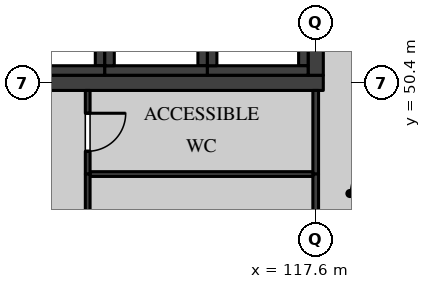
"""IFC4 building model, lengths in metres.
Left out: names, types, materials, properties, quantities, classifications, styles, units other than length and angle.
Written with IfcOpenShell. Run it as: python <this file> out.ifc"""

import sys

from ifc_helpers import new_model, si_unit, direction, frame, frame_2d, origin, place, context, subcontext, project, spatial, rectangle, extrude, element, fill, save


model = new_model("IFC4")
c1 = context("Model", 3, precision=1e-05, world=origin(), true_north=direction((0.0, 1.0)))
c2 = subcontext(c1, "Body", "Model", "MODEL_VIEW")
j1 = project(units=[si_unit("LENGTHUNIT", "METRE"), si_unit("PLANEANGLEUNIT", "RADIAN")], contexts=[c1])
p1 = place(None, origin())
s1 = spatial("IfcSite", under=j1, at=p1, CompositionType="ELEMENT")
p2 = place(p1, origin())
s2 = spatial("IfcBuilding", under=s1, at=p2, CompositionType="ELEMENT")
p3 = place(p2, origin())
s3 = spatial("IfcBuildingStorey", under=s2, at=p3, CompositionType="ELEMENT", Elevation=0.0)
p4 = place(p3, frame((109.0, 50.4, 0.0), z_axis=(0.0, 0.0, 1.0), x_axis=(1.0, 0.0, 0.0)))
e1 = element("IfcWall", 1, at=p4, inside=s3, PredefinedType="SHEAR", context=c2, shape_type="SweptSolid", body=[
    extrude(rectangle(XDim=8.8, YDim=0.4, at=frame_2d((4.4, 0.0))), origin(), (0.0, 0.0, 1.0), 5.05),
])
p5 = place(p3, frame((117.6, 50.6, 0.0), z_axis=(0.0, 0.0, 1.0), x_axis=(0.0, 1.0, 0.0)))
e2 = element("IfcWall", 2, at=p5, inside=s3, PredefinedType="SHEAR", context=c2, shape_type="SweptSolid", body=[
    extrude(rectangle(XDim=8.0, YDim=0.4, at=frame_2d((4.0, 0.0))), origin(), (0.0, 0.0, 1.0), 5.05),
])
p6 = place(p5, frame((3.25, 0.0, 0.0)))
e3 = element("IfcOpeningElement", 3, at=p6, cuts=e2, PredefinedType="OPENING", context=c2, shape_type="SweptSolid", body=[
    extrude(rectangle(XDim=1.2, YDim=2.1, at=frame_2d((0.6, 1.05))), frame((0.0, 0.21, 0.0), z_axis=(0.0, -1.0, 0.0), x_axis=(1.0, 0.0, 0.0)), (0.0, 0.0, 1.0), 0.42),
])
p7 = place(p5, frame((6.0, 0.0, 0.0)))
e4 = element("IfcOpeningElement", 4, at=p7, cuts=e2, PredefinedType="OPENING", context=c2, shape_type="SweptSolid", body=[
    extrude(rectangle(XDim=1.2, YDim=2.1, at=frame_2d((0.6, 1.05))), frame((0.0, 0.21, 0.0), z_axis=(0.0, -1.0, 0.0), x_axis=(1.0, 0.0, 0.0)), (0.0, 0.0, 1.0), 0.42),
])
p8 = place(p3, frame((111.925, 50.85, 0.0), z_axis=(0.0, 0.0, 1.0), x_axis=(0.0, 1.0, 0.0)))
e5 = element("IfcWall", 5, at=p8, inside=s3, PredefinedType="SOLIDWALL", context=c2, shape_type="SweptSolid", body=[
    extrude(rectangle(XDim=2.3, YDim=0.25, at=frame_2d((1.15, 0.0))), origin(), (0.0, 0.0, 1.0), 5.05),
])
p9 = place(p3, frame((109.4, 50.725, 0.0), z_axis=(0.0, 0.0, 1.0), x_axis=(1.0, 0.0, 0.0)))
e6 = element("IfcWall", 6, at=p9, inside=s3, PredefinedType="SOLIDWALL", context=c2, shape_type="SweptSolid", body=[
    extrude(rectangle(XDim=2.65, YDim=0.25, at=frame_2d((1.325, 0.0))), origin(), (0.0, 0.0, 1.0), 5.05),
])
p10 = place(p3, frame((114.625, 50.85, 0.0), z_axis=(0.0, 0.0, 1.0), x_axis=(0.0, 1.0, 0.0)))
e7 = element("IfcWall", 7, at=p10, inside=s3, PredefinedType="SOLIDWALL", context=c2, shape_type="SweptSolid", body=[
    extrude(rectangle(XDim=2.3, YDim=0.25, at=frame_2d((1.15, 0.0))), origin(), (0.0, 0.0, 1.0), 5.05),
])
p11 = place(p3, frame((112.05, 50.725, 0.0), z_axis=(0.0, 0.0, 1.0), x_axis=(1.0, 0.0, 0.0)))
e8 = element("IfcWall", 8, at=p11, inside=s3, PredefinedType="SOLIDWALL", context=c2, shape_type="SweptSolid", body=[
    extrude(rectangle(XDim=2.7, YDim=0.25, at=frame_2d((1.35, 0.0))), origin(), (0.0, 0.0, 1.0), 5.05),
])
for number, where, z_axis, x_axis in (
    (9, (112.175, 50.85, 0.0), (0.0, 0.0, 1.0), (0.0, 1.0, 0.0)),
    (10, (117.275, 50.85, 0.0), (0.0, 0.0, 1.0), (0.0, 1.0, 0.0)),
):
    element("IfcWall", number, at=place(p3, frame(where, z_axis=z_axis, x_axis=x_axis)), inside=s3, PredefinedType="SOLIDWALL", context=c2, shape_type="SweptSolid", body=[
        extrude(rectangle(XDim=2.3, YDim=0.25, at=frame_2d((1.15, 0.0))), origin(), (0.0, 0.0, 1.0), 5.05),
    ])
p12 = place(p3, frame((114.75, 50.725, 0.0), z_axis=(0.0, 0.0, 1.0), x_axis=(1.0, 0.0, 0.0)))
e11 = element("IfcWall", 11, at=p12, inside=s3, PredefinedType="SOLIDWALL", context=c2, shape_type="SweptSolid", body=[
    extrude(rectangle(XDim=2.65, YDim=0.25, at=frame_2d((1.325, 0.0))), origin(), (0.0, 0.0, 1.0), 5.05),
])
p13 = place(p3, frame((114.875, 50.85, 0.0), z_axis=(0.0, 0.0, 1.0), x_axis=(0.0, 1.0, 0.0)))
e12 = element("IfcWall", 12, at=p13, inside=s3, PredefinedType="SOLIDWALL", context=c2, shape_type="SweptSolid", body=[
    extrude(rectangle(XDim=2.3, YDim=0.25, at=frame_2d((1.15, 0.0))), origin(), (0.0, 0.0, 1.0), 5.05),
])
p14 = place(p3, frame((117.6, 48.0, 0.0), z_axis=(0.0, 0.0, 1.0), x_axis=(0.0, 1.0, 0.0)))
e13 = element("IfcWall", 13, at=p14, inside=s3, PredefinedType="PARTITIONING", context=c2, shape_type="SweptSolid", body=[
    extrude(rectangle(XDim=2.2, YDim=0.15, at=frame_2d((1.1, 0.0))), origin(), (0.0, 0.0, 1.0), 5.05),
])
p15 = place(p3, frame((117.6, 45.0, 0.0), z_axis=(0.0, 0.0, 1.0), x_axis=(0.0, 1.0, 0.0)))
e14 = element("IfcWall", 14, at=p15, inside=s3, PredefinedType="PARTITIONING", context=c2, shape_type="SweptSolid", body=[
    extrude(rectangle(XDim=3.0, YDim=0.15, at=frame_2d((1.5, 0.0))), origin(), (0.0, 0.0, 1.0), 5.05),
])
p16 = place(p3, frame((111.662, 48.0, 0.0), z_axis=(0.0, 0.0, 1.0), x_axis=(1.0, 0.0, 0.0)))
e15 = element("IfcWall", 15, at=p16, inside=s3, PredefinedType="PARTITIONING", context=c2, shape_type="SweptSolid", body=[
    extrude(rectangle(XDim=5.863, YDim=0.125, at=frame_2d((2.931, 0.0))), origin(), (0.0, 0.0, 1.0), 5.05),
])
p17 = place(p3, frame((111.6, 48.0, 0.0), z_axis=(0.0, 0.0, 1.0), x_axis=(0.0, 1.0, 0.0)))
e16 = element("IfcWall", 16, at=p17, inside=s3, PredefinedType="PARTITIONING", context=c2, shape_type="SweptSolid", body=[
    extrude(rectangle(XDim=2.2, YDim=0.125, at=frame_2d((1.1, 0.0))), origin(), (0.0, 0.0, 1.0), 5.05),
])
p18 = place(p17, frame((0.6, 0.0, 0.0)))
e17 = element("IfcOpeningElement", 17, at=p18, cuts=e16, PredefinedType="OPENING", context=c2, shape_type="SweptSolid", body=[
    extrude(rectangle(XDim=1.0, YDim=2.1, at=frame_2d((0.5, 1.05))), frame((0.0, 0.073, 0.0), z_axis=(0.0, -1.0, 0.0), x_axis=(1.0, 0.0, 0.0)), (0.0, 0.0, 1.0), 0.145),
])
p19 = place(p3, frame((111.6, 45.0, 0.0), z_axis=(0.0, 0.0, 1.0), x_axis=(0.0, 1.0, 0.0)))
e18 = element("IfcWall", 18, at=p19, inside=s3, PredefinedType="PARTITIONING", context=c2, shape_type="SweptSolid", body=[
    extrude(rectangle(XDim=3.0, YDim=0.125, at=frame_2d((1.5, 0.0))), origin(), (0.0, 0.0, 1.0), 5.05),
])
p20 = place(p19, frame((1.05, 0.0, 0.0)))
e19 = element("IfcOpeningElement", 19, at=p20, cuts=e18, PredefinedType="OPENING", context=c2, shape_type="SweptSolid", body=[
    extrude(rectangle(XDim=0.9, YDim=2.1, at=frame_2d((0.45, 1.05))), frame((0.0, 0.073, 0.0), z_axis=(0.0, -1.0, 0.0), x_axis=(1.0, 0.0, 0.0)), (0.0, 0.0, 1.0), 0.145),
])
p21 = place(p18, frame((1.0, 0.0, 0.0), z_axis=(0.0, 0.0, 1.0), x_axis=(-1.0, 0.0, 0.0)))
e20 = element("IfcDoor", 20, at=p21, inside=s3, OperationType="SINGLE_SWING_RIGHT", PredefinedType="DOOR", context=c2, shape_type="SweptSolid", body=[
    extrude(rectangle(XDim=1.0, YDim=2.1, at=frame_2d((0.5, 1.05))), frame((0.0, 0.02, 0.0), z_axis=(0.0, -1.0, 0.0), x_axis=(1.0, 0.0, 0.0)), (0.0, 0.0, 1.0), 0.04),
])
fill(e17, e20)
save(model, sys.argv[1])
